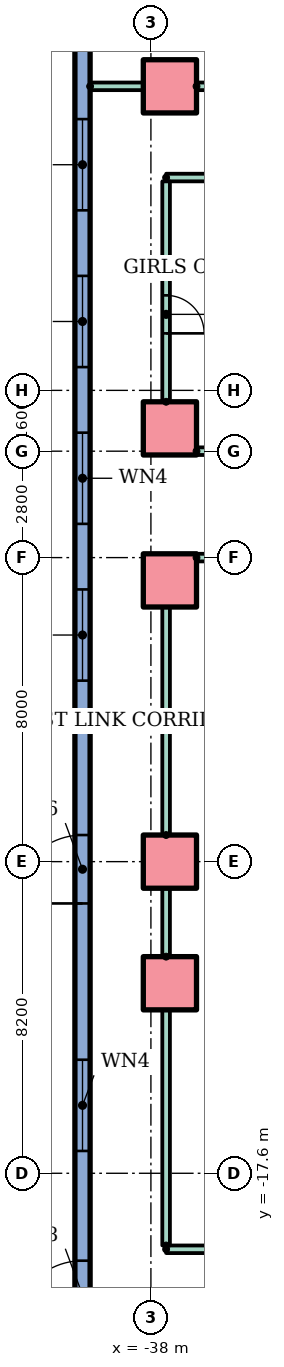
"""IFC4 building model, lengths in metres.
Left out: names, types, materials, properties, quantities, classifications, styles, units other than length and angle.
Written with IfcOpenShell. Run it as: python <this file> out.ifc"""

import sys

from ifc_helpers import new_model, si_unit, direction, frame, frame_2d, origin, origin_2d, place, context, subcontext, project, spatial, rectangle, hollow_rectangle, extrude, element, fill, save


model = new_model("IFC4")
c1 = context("Model", 3, precision=1e-05, world=origin(), true_north=direction((0.0, 1.0)))
c2 = subcontext(c1, "Body", "Model", "MODEL_VIEW")
j1 = project(units=[si_unit("LENGTHUNIT", "METRE"), si_unit("PLANEANGLEUNIT", "RADIAN")], contexts=[c1])
p1 = place(None, origin())
s1 = spatial("IfcSite", under=j1, at=p1, CompositionType="ELEMENT")
p2 = place(p1, origin())
s2 = spatial("IfcBuilding", under=s1, at=p2, CompositionType="ELEMENT")
p3 = place(p2, origin())
s3 = spatial("IfcBuildingStorey", under=s2, at=p3, CompositionType="ELEMENT", Elevation=0.0)
for number, where in (
    (1, (-37.5, -12.6, 0.0)),
    (2, (-37.5, -9.4, 0.0)),
    (3, (-37.5, -2.0, 0.0)),
    (4, (-37.5, 2.0, 0.0)),
    (5, (-37.5, 11.0, 0.0)),
):
    element("IfcColumn", number, at=place(p3, frame(where)), inside=s3, PredefinedType="COLUMN", context=c2, shape_type="SweptSolid", body=[
        extrude(hollow_rectangle(XDim=1.4, YDim=1.4, WallThickness=0.08, at=origin_2d()), origin(), (0.0, 0.0, 1.0), 6.0),
    ])
p4 = place(p3, frame((-39.8, 20.0, 0.0), z_axis=(0.0, 0.0, 1.0), x_axis=(0.0, -1.0, 0.0)))
e6 = element("IfcWall", 6, at=p4, inside=s3, PredefinedType="STANDARD", context=c2, shape_type="SweptSolid", body=[
    extrude(rectangle(XDim=70.0, YDim=0.4, at=frame_2d((35.0, 0.0))), origin(), (0.0, 0.0, 1.0), 5.7),
])
p5 = place(p4, frame((50.267, 0.0, 0.0)))
e7 = element("IfcOpeningElement", 7, at=p5, cuts=e6, PredefinedType="OPENING", context=c2, shape_type="SweptSolid", body=[
    extrude(rectangle(XDim=1.8, YDim=2.4, at=frame_2d((0.9, 1.2))), frame((0.0, 0.21, 0.0), z_axis=(0.0, -1.0, 0.0), x_axis=(1.0, 0.0, 0.0)), (0.0, 0.0, 1.0), 0.42),
])
p6 = place(p4, frame((1.05, 0.0, 0.9)))
e8 = element("IfcOpeningElement", 8, at=p6, cuts=e6, PredefinedType="OPENING", context=c2, shape_type="SweptSolid", body=[
    extrude(rectangle(XDim=2.4, YDim=2.4, at=frame_2d((1.2, 1.2))), frame((0.0, 0.21, 0.0), z_axis=(0.0, -1.0, 0.0), x_axis=(1.0, 0.0, 0.0)), (0.0, 0.0, 1.0), 0.42),
])
p7 = place(p4, frame((5.55, 0.0, 0.9)))
e9 = element("IfcOpeningElement", 9, at=p7, cuts=e6, PredefinedType="OPENING", context=c2, shape_type="SweptSolid", body=[
    extrude(rectangle(XDim=2.4, YDim=2.4, at=frame_2d((1.2, 1.2))), frame((0.0, 0.21, 0.0), z_axis=(0.0, -1.0, 0.0), x_axis=(1.0, 0.0, 0.0)), (0.0, 0.0, 1.0), 0.42),
])
p8 = place(p4, frame((9.863, 0.0, 0.9)))
e10 = element("IfcOpeningElement", 10, at=p8, cuts=e6, PredefinedType="OPENING", context=c2, shape_type="SweptSolid", body=[
    extrude(rectangle(XDim=2.4, YDim=2.4, at=frame_2d((1.2, 1.2))), frame((0.0, 0.21, 0.0), z_axis=(0.0, -1.0, 0.0), x_axis=(1.0, 0.0, 0.0)), (0.0, 0.0, 1.0), 0.42),
])
p9 = place(p4, frame((13.988, 0.0, 0.9)))
e11 = element("IfcOpeningElement", 11, at=p9, cuts=e6, PredefinedType="OPENING", context=c2, shape_type="SweptSolid", body=[
    extrude(rectangle(XDim=2.4, YDim=2.4, at=frame_2d((1.2, 1.2))), frame((0.0, 0.21, 0.0), z_axis=(0.0, -1.0, 0.0), x_axis=(1.0, 0.0, 0.0)), (0.0, 0.0, 1.0), 0.42),
])
p10 = place(p4, frame((18.113, 0.0, 0.9)))
e12 = element("IfcOpeningElement", 12, at=p10, cuts=e6, PredefinedType="OPENING", context=c2, shape_type="SweptSolid", body=[
    extrude(rectangle(XDim=2.4, YDim=2.4, at=frame_2d((1.2, 1.2))), frame((0.0, 0.21, 0.0), z_axis=(0.0, -1.0, 0.0), x_axis=(1.0, 0.0, 0.0)), (0.0, 0.0, 1.0), 0.42),
])
p11 = place(p4, frame((22.238, 0.0, 0.9)))
e13 = element("IfcOpeningElement", 13, at=p11, cuts=e6, PredefinedType="OPENING", context=c2, shape_type="SweptSolid", body=[
    extrude(rectangle(XDim=2.4, YDim=2.4, at=frame_2d((1.2, 1.2))), frame((0.0, 0.21, 0.0), z_axis=(0.0, -1.0, 0.0), x_axis=(1.0, 0.0, 0.0)), (0.0, 0.0, 1.0), 0.42),
])
p12 = place(p4, frame((34.613, 0.0, 0.9)))
e14 = element("IfcOpeningElement", 14, at=p12, cuts=e6, PredefinedType="OPENING", context=c2, shape_type="SweptSolid", body=[
    extrude(rectangle(XDim=2.4, YDim=2.4, at=frame_2d((1.2, 1.2))), frame((0.0, 0.21, 0.0), z_axis=(0.0, -1.0, 0.0), x_axis=(1.0, 0.0, 0.0)), (0.0, 0.0, 1.0), 0.42),
])
p13 = place(p4, frame((42.633, 0.0, 0.9)))
e15 = element("IfcOpeningElement", 15, at=p13, cuts=e6, PredefinedType="OPENING", context=c2, shape_type="SweptSolid", body=[
    extrude(rectangle(XDim=2.4, YDim=2.4, at=frame_2d((1.2, 1.2))), frame((0.0, 0.21, 0.0), z_axis=(0.0, -1.0, 0.0), x_axis=(1.0, 0.0, 0.0)), (0.0, 0.0, 1.0), 0.42),
])
p14 = place(p4, frame((46.3, 0.0, 0.9)))
e16 = element("IfcOpeningElement", 16, at=p14, cuts=e6, PredefinedType="OPENING", context=c2, shape_type="SweptSolid", body=[
    extrude(rectangle(XDim=2.4, YDim=2.4, at=frame_2d((1.2, 1.2))), frame((0.0, 0.21, 0.0), z_axis=(0.0, -1.0, 0.0), x_axis=(1.0, 0.0, 0.0)), (0.0, 0.0, 1.0), 0.42),
])
p15 = place(p4, frame((66.85, 0.0, 0.9)))
e17 = element("IfcOpeningElement", 17, at=p15, cuts=e6, PredefinedType="OPENING", context=c2, shape_type="SweptSolid", body=[
    extrude(rectangle(XDim=2.4, YDim=2.4, at=frame_2d((1.2, 1.2))), frame((0.0, 0.21, 0.0), z_axis=(0.0, -1.0, 0.0), x_axis=(1.0, 0.0, 0.0)), (0.0, 0.0, 1.0), 0.42),
])
p16 = place(p4, frame((28.7, 0.0, 0.0)))
e18 = element("IfcOpeningElement", 18, at=p16, cuts=e6, PredefinedType="OPENING", context=c2, shape_type="SweptSolid", body=[
    extrude(rectangle(XDim=1.8, YDim=2.1, at=frame_2d((0.9, 1.05))), frame((0.0, 0.21, 0.0), z_axis=(0.0, -1.0, 0.0), x_axis=(1.0, 0.0, 0.0)), (0.0, 0.0, 1.0), 0.42),
])
p17 = place(p4, frame((39.9, 0.0, 0.0)))
e19 = element("IfcOpeningElement", 19, at=p17, cuts=e6, PredefinedType="OPENING", context=c2, shape_type="SweptSolid", body=[
    extrude(rectangle(XDim=1.8, YDim=2.1, at=frame_2d((0.9, 1.05))), frame((0.0, 0.21, 0.0), z_axis=(0.0, -1.0, 0.0), x_axis=(1.0, 0.0, 0.0)), (0.0, 0.0, 1.0), 0.42),
])
p18 = place(p3, frame((-37.6, -19.6, 0.0)))
e20 = element("IfcWall", 20, at=p18, inside=s3, PredefinedType="PARTITIONING", context=c2, shape_type="SweptSolid", body=[
    extrude(rectangle(XDim=75.2, YDim=0.2, at=frame_2d((37.6, 0.0))), origin(), (0.0, 0.0, 1.0), 5.7),
])
p19 = place(p18, frame((26.204, 0.0, 0.0)))
e21 = element("IfcOpeningElement", 21, at=p19, cuts=e20, PredefinedType="OPENING", context=c2, shape_type="SweptSolid", body=[
    extrude(rectangle(XDim=1.8, YDim=2.1, at=frame_2d((0.9, 1.05))), frame((0.0, 0.11, 0.0), z_axis=(0.0, -1.0, 0.0), x_axis=(1.0, 0.0, 0.0)), (0.0, 0.0, 1.0), 0.22),
])
p20 = place(p18, frame((36.7, 0.0, 0.0)))
e22 = element("IfcOpeningElement", 22, at=p20, cuts=e20, PredefinedType="OPENING", context=c2, shape_type="SweptSolid", body=[
    extrude(rectangle(XDim=1.8, YDim=2.1, at=frame_2d((0.9, 1.05))), frame((0.0, 0.11, 0.0), z_axis=(0.0, -1.0, 0.0), x_axis=(1.0, 0.0, 0.0)), (0.0, 0.0, 1.0), 0.22),
])
p21 = place(p18, frame((47.196, 0.0, 0.0)))
e23 = element("IfcOpeningElement", 23, at=p21, cuts=e20, PredefinedType="OPENING", context=c2, shape_type="SweptSolid", body=[
    extrude(rectangle(XDim=1.8, YDim=2.1, at=frame_2d((0.9, 1.05))), frame((0.0, 0.11, 0.0), z_axis=(0.0, -1.0, 0.0), x_axis=(1.0, 0.0, 0.0)), (0.0, 0.0, 1.0), 0.22),
])
for number, where in (
    (24, (-36.8, -1.4, 0.0)),
    (25, (-36.8, 1.4, 0.0)),
):
    element("IfcWall", number, at=place(p3, frame(where)), inside=s3, PredefinedType="PARTITIONING", context=c2, shape_type="SweptSolid", body=[
        extrude(rectangle(XDim=6.25, YDim=0.2, at=frame_2d((3.125, 0.0))), origin(), (0.0, 0.0, 1.0), 5.7),
    ])
p22 = place(p3, frame((-37.6, 8.6, 0.0)))
e26 = element("IfcWall", 26, at=p22, inside=s3, PredefinedType="PARTITIONING", context=c2, shape_type="SweptSolid", body=[
    extrude(rectangle(XDim=21.3, YDim=0.2, at=frame_2d((10.65, 0.0))), origin(), (0.0, 0.0, 1.0), 5.7),
])
p23 = place(p3, frame((-39.6, 11.0, 0.0)))
e27 = element("IfcWall", 27, at=p23, inside=s3, PredefinedType="PARTITIONING", context=c2, shape_type="SweptSolid", body=[
    extrude(rectangle(XDim=1.4, YDim=0.2, at=frame_2d((0.7, 0.0))), origin(), (0.0, 0.0, 1.0), 5.7),
])
p24 = place(p3, frame((-36.8, 11.0, 0.0)))
e28 = element("IfcWall", 28, at=p24, inside=s3, PredefinedType="PARTITIONING", context=c2, shape_type="SweptSolid", body=[
    extrude(rectangle(XDim=6.25, YDim=0.2, at=frame_2d((3.125, 0.0))), origin(), (0.0, 0.0, 1.0), 5.7),
])
p25 = place(p24, frame((0.5, 0.0, 0.0)))
e29 = element("IfcOpeningElement", 29, at=p25, cuts=e28, PredefinedType="OPENING", context=c2, shape_type="SweptSolid", body=[
    extrude(rectangle(XDim=1.0, YDim=2.1, at=frame_2d((0.5, 1.05))), frame((0.0, 0.11, 0.0), z_axis=(0.0, -1.0, 0.0), x_axis=(1.0, 0.0, 0.0)), (0.0, 0.0, 1.0), 0.22),
])
p26 = place(p24, frame((4.8, 0.0, 0.0)))
e30 = element("IfcOpeningElement", 30, at=p26, cuts=e28, PredefinedType="OPENING", context=c2, shape_type="SweptSolid", body=[
    extrude(rectangle(XDim=1.0, YDim=2.1, at=frame_2d((0.5, 1.05))), frame((0.0, 0.11, 0.0), z_axis=(0.0, -1.0, 0.0), x_axis=(1.0, 0.0, 0.0)), (0.0, 0.0, 1.0), 0.22),
])
p27 = place(p3, frame((-37.6, -19.5, 0.0), z_axis=(0.0, 0.0, 1.0), x_axis=(0.0, 1.0, 0.0)))
e31 = element("IfcWall", 31, at=p27, inside=s3, PredefinedType="PARTITIONING", context=c2, shape_type="SweptSolid", body=[
    extrude(rectangle(XDim=6.2, YDim=0.2, at=frame_2d((3.1, 0.0))), origin(), (0.0, 0.0, 1.0), 5.7),
])
p28 = place(p3, frame((-37.6, -11.9, 0.0), z_axis=(0.0, 0.0, 1.0), x_axis=(0.0, 1.0, 0.0)))
e32 = element("IfcWall", 32, at=p28, inside=s3, PredefinedType="PARTITIONING", context=c2, shape_type="SweptSolid", body=[
    extrude(rectangle(XDim=1.8, YDim=0.2, at=frame_2d((0.9, 0.0))), origin(), (0.0, 0.0, 1.0), 5.7),
])
p29 = place(p3, frame((-37.6, -8.7, 0.0), z_axis=(0.0, 0.0, 1.0), x_axis=(0.0, 1.0, 0.0)))
e33 = element("IfcWall", 33, at=p29, inside=s3, PredefinedType="PARTITIONING", context=c2, shape_type="SweptSolid", body=[
    extrude(rectangle(XDim=6.0, YDim=0.2, at=frame_2d((3.0, 0.0))), origin(), (0.0, 0.0, 1.0), 5.7),
])
p30 = place(p3, frame((-37.6, 2.7, 0.0), z_axis=(0.0, 0.0, 1.0), x_axis=(0.0, 1.0, 0.0)))
e34 = element("IfcWall", 34, at=p30, inside=s3, PredefinedType="PARTITIONING", context=c2, shape_type="SweptSolid", body=[
    extrude(rectangle(XDim=5.8, YDim=0.2, at=frame_2d((2.9, 0.0))), origin(), (0.0, 0.0, 1.0), 5.7),
])
p31 = place(p30, frame((1.8, 0.0, 0.0)))
e35 = element("IfcOpeningElement", 35, at=p31, cuts=e34, PredefinedType="OPENING", context=c2, shape_type="SweptSolid", body=[
    extrude(rectangle(XDim=1.0, YDim=2.1, at=frame_2d((0.5, 1.05))), frame((0.0, 0.11, 0.0), z_axis=(0.0, -1.0, 0.0), x_axis=(1.0, 0.0, 0.0)), (0.0, 0.0, 1.0), 0.22),
])
p32 = place(p8, origin())
e36 = element("IfcWindow", 36, at=p32, inside=s3, PartitioningType="SINGLE_PANEL", PredefinedType="WINDOW", context=c2, shape_type="SweptSolid", body=[
    extrude(rectangle(XDim=2.4, YDim=2.4, at=frame_2d((1.2, 1.2))), frame((0.0, 0.03, 0.0), z_axis=(0.0, -1.0, 0.0), x_axis=(1.0, 0.0, 0.0)), (0.0, 0.0, 1.0), 0.06),
])
fill(e10, e36)
p33 = place(p9, origin())
e37 = element("IfcWindow", 37, at=p33, inside=s3, PartitioningType="SINGLE_PANEL", PredefinedType="WINDOW", context=c2, shape_type="SweptSolid", body=[
    extrude(rectangle(XDim=2.4, YDim=2.4, at=frame_2d((1.2, 1.2))), frame((0.0, 0.03, 0.0), z_axis=(0.0, -1.0, 0.0), x_axis=(1.0, 0.0, 0.0)), (0.0, 0.0, 1.0), 0.06),
])
fill(e11, e37)
p34 = place(p10, origin())
e38 = element("IfcWindow", 38, at=p34, inside=s3, PartitioningType="SINGLE_PANEL", PredefinedType="WINDOW", context=c2, shape_type="SweptSolid", body=[
    extrude(rectangle(XDim=2.4, YDim=2.4, at=frame_2d((1.2, 1.2))), frame((0.0, 0.03, 0.0), z_axis=(0.0, -1.0, 0.0), x_axis=(1.0, 0.0, 0.0)), (0.0, 0.0, 1.0), 0.06),
])
fill(e12, e38)
p35 = place(p11, origin())
e39 = element("IfcWindow", 39, at=p35, inside=s3, PartitioningType="SINGLE_PANEL", PredefinedType="WINDOW", context=c2, shape_type="SweptSolid", body=[
    extrude(rectangle(XDim=2.4, YDim=2.4, at=frame_2d((1.2, 1.2))), frame((0.0, 0.03, 0.0), z_axis=(0.0, -1.0, 0.0), x_axis=(1.0, 0.0, 0.0)), (0.0, 0.0, 1.0), 0.06),
])
fill(e13, e39)
p36 = place(p12, origin())
e40 = element("IfcWindow", 40, at=p36, inside=s3, PartitioningType="SINGLE_PANEL", PredefinedType="WINDOW", context=c2, shape_type="SweptSolid", body=[
    extrude(rectangle(XDim=2.4, YDim=2.4, at=frame_2d((1.2, 1.2))), frame((0.0, 0.03, 0.0), z_axis=(0.0, -1.0, 0.0), x_axis=(1.0, 0.0, 0.0)), (0.0, 0.0, 1.0), 0.06),
])
fill(e14, e40)
p37 = place(p31, frame((1.0, 0.0, 0.0), z_axis=(0.0, 0.0, 1.0), x_axis=(-1.0, 0.0, 0.0)))
e41 = element("IfcDoor", 41, at=p37, inside=s3, OperationType="SINGLE_SWING_LEFT", PredefinedType="DOOR", context=c2, shape_type="SweptSolid", body=[
    extrude(rectangle(XDim=1.0, YDim=2.1, at=frame_2d((0.5, 1.05))), frame((0.0, 0.025, 0.0), z_axis=(0.0, -1.0, 0.0), x_axis=(1.0, 0.0, 0.0)), (0.0, 0.0, 1.0), 0.05),
])
fill(e35, e41)
p38 = place(p16, frame((1.8, 0.0, 0.0), z_axis=(0.0, 0.0, 1.0), x_axis=(-1.0, 0.0, 0.0)))
e42 = element("IfcDoor", 42, at=p38, inside=s3, OperationType="DOUBLE_DOOR_SINGLE_SWING", PredefinedType="DOOR", context=c2, shape_type="SweptSolid", body=[
    extrude(rectangle(XDim=1.8, YDim=2.1, at=frame_2d((0.9, 1.05))), frame((0.0, 0.025, 0.0), z_axis=(0.0, -1.0, 0.0), x_axis=(1.0, 0.0, 0.0)), (0.0, 0.0, 1.0), 0.05),
])
fill(e18, e42)
p39 = place(p17, frame((1.8, 0.0, 0.0), z_axis=(0.0, 0.0, 1.0), x_axis=(-1.0, 0.0, 0.0)))
e43 = element("IfcDoor", 43, at=p39, inside=s3, OperationType="DOUBLE_DOOR_SINGLE_SWING", PredefinedType="DOOR", context=c2, shape_type="SweptSolid", body=[
    extrude(rectangle(XDim=1.8, YDim=2.1, at=frame_2d((0.9, 1.05))), frame((0.0, 0.025, 0.0), z_axis=(0.0, -1.0, 0.0), x_axis=(1.0, 0.0, 0.0)), (0.0, 0.0, 1.0), 0.05),
])
fill(e19, e43)
save(model, sys.argv[1])
